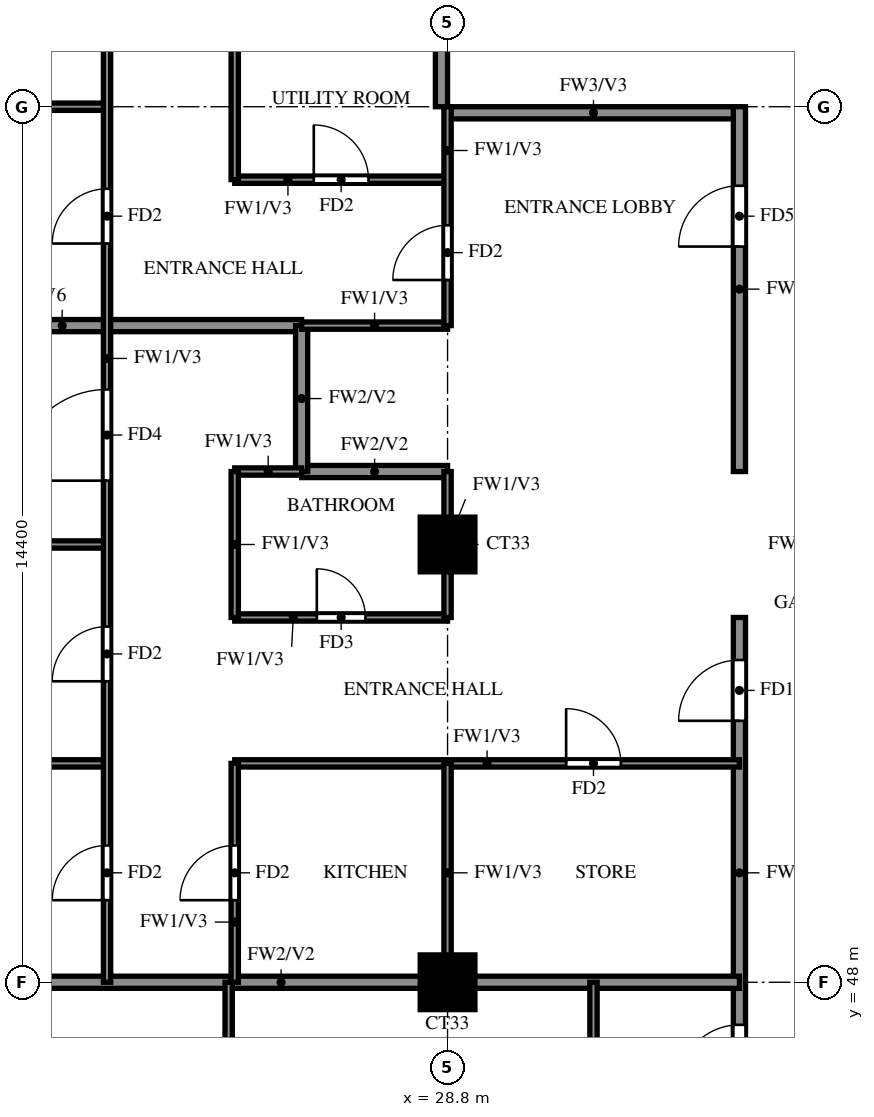
"""IFC4 building model, lengths in metres.
Left out: names, types, materials, properties, quantities, classifications, styles, units other than length and angle.
Written with IfcOpenShell. Run it as: python <this file> out.ifc"""

import sys

from ifc_helpers import new_model, si_unit, direction, frame, frame_2d, origin, origin_2d, place, context, subcontext, project, spatial, rectangle, extrude, source, transform, mapped, element, fill, save


model = new_model("IFC4")
c1 = context("Model", 3, precision=1e-05, world=origin(), true_north=direction((0.0, 1.0)))
c2 = subcontext(c1, "Body", "Model", "MODEL_VIEW")
j1 = project(units=[si_unit("LENGTHUNIT", "METRE"), si_unit("PLANEANGLEUNIT", "RADIAN")], contexts=[c1])
p1 = place(None, origin())
s1 = spatial("IfcSite", under=j1, at=p1, CompositionType="ELEMENT")
p2 = place(p1, origin())
s2 = spatial("IfcBuilding", under=s1, at=p2, CompositionType="ELEMENT")
p3 = place(p2, frame((0.0, 0.0, 211.5)))
s3 = spatial("IfcBuildingStorey", under=s2, at=p3, CompositionType="ELEMENT", Elevation=211.5)
m1 = source(origin(), c2, "Body", "SweptSolid", [
    extrude(rectangle(XDim=0.9, YDim=0.9, at=origin_2d()), origin(), (0.0, 0.0, 1.0), 3.22),
])
for number, where, z_axis, x_axis in (
    (1, (28.8, 48.0, 0.0), (0.0, 0.0, 1.0), (1.0, 0.0, 0.0)),
    (2, (28.8, 55.2, 0.0), (0.0, 0.0, 1.0), (1.0, 0.0, 0.0)),
):
    element("IfcColumn", number, at=place(p3, frame(where, z_axis=z_axis, x_axis=x_axis)), inside=s3, PredefinedType="COLUMN", context=c2, shape_type="MappedRepresentation", body=[
        mapped(m1, transform((0.0, 0.0, 0.0))),
    ])
p4 = place(p3, frame((28.8, 62.3, 0.0), z_axis=(0.0, 0.0, 1.0), x_axis=(1.0, 0.0, 0.0)))
e3 = element("IfcWall", 3, at=p4, inside=s3, PredefinedType="SOLIDWALL", context=c2, shape_type="SweptSolid", body=[
    extrude(rectangle(XDim=4.8, YDim=0.2, at=frame_2d((2.4, 0.0))), origin(), (0.0, 0.0, 1.0), 3.22),
])
p5 = place(p3, frame((28.7, 62.4, 0.0), z_axis=(0.0, 0.0, 1.0), x_axis=(0.0, 1.0, 0.0)))
e4 = element("IfcWall", 4, at=p5, inside=s3, PredefinedType="SOLIDWALL", context=c2, shape_type="SweptSolid", body=[
    extrude(rectangle(XDim=15.6, YDim=0.2, at=frame_2d((7.8, 0.0))), origin(), (0.0, 0.0, 1.0), 3.22),
])
p6 = place(p3, frame((33.6, 45.6, 0.0), z_axis=(0.0, 0.0, 1.0), x_axis=(0.0, 1.0, 0.0)))
e5 = element("IfcWall", 5, at=p6, inside=s3, PredefinedType="SOLIDWALL", context=c2, shape_type="SweptSolid", body=[
    extrude(rectangle(XDim=8.4, YDim=0.2, at=frame_2d((4.2, 0.0))), origin(), (0.0, 0.0, 1.0), 3.22),
])
p7 = place(p6, frame((0.7, 0.0, 0.0)))
e6 = element("IfcOpeningElement", 6, at=p7, cuts=e5, PredefinedType="OPENING", context=c2, shape_type="SweptSolid", body=[
    extrude(rectangle(XDim=1.0, YDim=2.1, at=frame_2d((0.5, 1.05))), frame((0.0, 0.11, 0.0), z_axis=(0.0, -1.0, 0.0), x_axis=(1.0, 0.0, 0.0)), (0.0, 0.0, 1.0), 0.22),
])
p8 = place(p6, frame((6.7, 0.0, 0.0)))
e7 = element("IfcOpeningElement", 7, at=p8, cuts=e5, PredefinedType="OPENING", context=c2, shape_type="SweptSolid", body=[
    extrude(rectangle(XDim=1.0, YDim=2.1, at=frame_2d((0.5, 1.05))), frame((0.0, 0.11, 0.0), z_axis=(0.0, -1.0, 0.0), x_axis=(1.0, 0.0, 0.0)), (0.0, 0.0, 1.0), 0.22),
])
p9 = place(p3, frame((33.6, 56.4, 0.0), z_axis=(0.0, 0.0, 1.0), x_axis=(0.0, 1.0, 0.0)))
e8 = element("IfcWall", 8, at=p9, inside=s3, PredefinedType="SOLIDWALL", context=c2, shape_type="SweptSolid", body=[
    extrude(rectangle(XDim=6.0, YDim=0.2, at=frame_2d((3.0, 0.0))), origin(), (0.0, 0.0, 1.0), 3.22),
])
p10 = place(p9, frame((3.7, 0.0, 0.0)))
e9 = element("IfcOpeningElement", 9, at=p10, cuts=e8, PredefinedType="OPENING", context=c2, shape_type="SweptSolid", body=[
    extrude(rectangle(XDim=1.0, YDim=2.1, at=frame_2d((0.5, 1.05))), frame((0.0, 0.11, 0.0), z_axis=(0.0, -1.0, 0.0), x_axis=(1.0, 0.0, 0.0)), (0.0, 0.0, 1.0), 0.22),
])
p11 = place(p3, frame((18.525, 48.0, 0.0), z_axis=(0.0, 0.0, 1.0), x_axis=(1.0, 0.0, 0.0)))
e10 = element("IfcWall", 10, at=p11, inside=s3, PredefinedType="SOLIDWALL", context=c2, shape_type="SweptSolid", body=[
    extrude(rectangle(XDim=15.075, YDim=0.2, at=frame_2d((7.538, 0.0))), origin(), (0.0, 0.0, 1.0), 3.22),
])
p12 = place(p3, frame((26.4, 56.4, 0.0), z_axis=(0.0, 0.0, 1.0), x_axis=(1.0, 0.0, 0.0)))
e11 = element("IfcWall", 11, at=p12, inside=s3, PredefinedType="SOLIDWALL", context=c2, shape_type="SweptSolid", body=[
    extrude(rectangle(XDim=2.4, YDim=0.2, at=frame_2d((1.2, 0.0))), origin(), (0.0, 0.0, 1.0), 3.22),
])
p13 = place(p3, frame((18.525, 58.8, 0.0), z_axis=(0.0, 0.0, 1.0), x_axis=(1.0, 0.0, 0.0)))
e12 = element("IfcWall", 12, at=p13, inside=s3, PredefinedType="SOLIDWALL", context=c2, shape_type="SweptSolid", body=[
    extrude(rectangle(XDim=7.875, YDim=0.2, at=frame_2d((3.938, 0.0))), origin(), (0.0, 0.0, 1.0), 2.32),
])
p14 = place(p3, frame((26.4, 56.4, 0.0), z_axis=(0.0, 0.0, 1.0), x_axis=(0.0, 1.0, 0.0)))
e13 = element("IfcWall", 13, at=p14, inside=s3, PredefinedType="SOLIDWALL", context=c2, shape_type="SweptSolid", body=[
    extrude(rectangle(XDim=2.4, YDim=0.2, at=frame_2d((1.2, 0.0))), origin(), (0.0, 0.0, 1.0), 3.22),
])
p15 = place(p3, frame((18.525, 51.6, 0.0), z_axis=(0.0, 0.0, 1.0), x_axis=(1.0, 0.0, 0.0)))
e14 = element("IfcWall", 14, at=p15, inside=s3, PredefinedType="PARTITIONING", context=c2, shape_type="SweptSolid", body=[
    extrude(rectangle(XDim=4.675, YDim=0.12, at=frame_2d((2.337, 0.0))), origin(), (0.0, 0.0, 1.0), 2.32),
])
p16 = place(p3, frame((25.3, 51.6, 0.0), z_axis=(0.0, 0.0, 1.0), x_axis=(1.0, 0.0, 0.0)))
e15 = element("IfcWall", 15, at=p16, inside=s3, PredefinedType="PARTITIONING", context=c2, shape_type="SweptSolid", body=[
    extrude(rectangle(XDim=8.3, YDim=0.12, at=frame_2d((4.15, 0.0))), origin(), (0.0, 0.0, 1.0), 3.22),
])
p17 = place(p16, frame((5.45, 0.0, 0.0)))
e16 = element("IfcOpeningElement", 16, at=p17, cuts=e15, PredefinedType="OPENING", context=c2, shape_type="SweptSolid", body=[
    extrude(rectangle(XDim=0.9, YDim=2.1, at=frame_2d((0.45, 1.05))), frame((0.0, 0.07, 0.0), z_axis=(0.0, -1.0, 0.0), x_axis=(1.0, 0.0, 0.0)), (0.0, 0.0, 1.0), 0.14),
])
p18 = place(p3, frame((25.3, 54.0, 0.0), z_axis=(0.0, 0.0, 1.0), x_axis=(1.0, 0.0, 0.0)))
e17 = element("IfcWall", 17, at=p18, inside=s3, PredefinedType="PARTITIONING", context=c2, shape_type="SweptSolid", body=[
    extrude(rectangle(XDim=3.5, YDim=0.12, at=frame_2d((1.75, 0.0))), origin(), (0.0, 0.0, 1.0), 3.22),
])
p19 = place(p18, frame((1.35, 0.0, 0.0)))
e18 = element("IfcOpeningElement", 18, at=p19, cuts=e17, PredefinedType="OPENING", context=c2, shape_type="SweptSolid", body=[
    extrude(rectangle(XDim=0.8, YDim=2.1, at=frame_2d((0.4, 1.05))), frame((0.0, 0.07, 0.0), z_axis=(0.0, -1.0, 0.0), x_axis=(1.0, 0.0, 0.0)), (0.0, 0.0, 1.0), 0.14),
])
p20 = place(p3, frame((18.525, 55.2, 0.0), z_axis=(0.0, 0.0, 1.0), x_axis=(1.0, 0.0, 0.0)))
e19 = element("IfcWall", 19, at=p20, inside=s3, PredefinedType="PARTITIONING", context=c2, shape_type="SweptSolid", body=[
    extrude(rectangle(XDim=4.675, YDim=0.12, at=frame_2d((2.337, 0.0))), origin(), (0.0, 0.0, 1.0), 3.22),
])
p21 = place(p3, frame((25.3, 56.4, 0.0), z_axis=(0.0, 0.0, 1.0), x_axis=(1.0, 0.0, 0.0)))
e20 = element("IfcWall", 20, at=p21, inside=s3, PredefinedType="PARTITIONING", context=c2, shape_type="SweptSolid", body=[
    extrude(rectangle(XDim=1.1, YDim=0.12, at=frame_2d((0.55, 0.0))), origin(), (0.0, 0.0, 1.0), 3.22),
])
p22 = place(p3, frame((26.4, 58.8, 0.0), z_axis=(0.0, 0.0, 1.0), x_axis=(1.0, 0.0, 0.0)))
e21 = element("IfcWall", 21, at=p22, inside=s3, PredefinedType="PARTITIONING", context=c2, shape_type="SweptSolid", body=[
    extrude(rectangle(XDim=2.4, YDim=0.12, at=frame_2d((1.2, 0.0))), origin(), (0.0, 0.0, 1.0), 3.22),
])
p23 = place(p3, frame((25.3, 61.2, 0.0), z_axis=(0.0, 0.0, 1.0), x_axis=(1.0, 0.0, 0.0)))
e22 = element("IfcWall", 22, at=p23, inside=s3, PredefinedType="PARTITIONING", context=c2, shape_type="SweptSolid", body=[
    extrude(rectangle(XDim=3.5, YDim=0.12, at=frame_2d((1.75, 0.0))), origin(), (0.0, 0.0, 1.0), 3.22),
])
p24 = place(p23, frame((1.3, 0.0, 0.0)))
e23 = element("IfcOpeningElement", 23, at=p24, cuts=e22, PredefinedType="OPENING", context=c2, shape_type="SweptSolid", body=[
    extrude(rectangle(XDim=0.9, YDim=2.1, at=frame_2d((0.45, 1.05))), frame((0.0, 0.07, 0.0), z_axis=(0.0, -1.0, 0.0), x_axis=(1.0, 0.0, 0.0)), (0.0, 0.0, 1.0), 0.14),
])
p25 = place(p3, frame((18.525, 62.4, 0.0), z_axis=(0.0, 0.0, 1.0), x_axis=(1.0, 0.0, 0.0)))
e24 = element("IfcWall", 24, at=p25, inside=s3, PredefinedType="PARTITIONING", context=c2, shape_type="SweptSolid", body=[
    extrude(rectangle(XDim=4.675, YDim=0.12, at=frame_2d((2.337, 0.0))), origin(), (0.0, 0.0, 1.0), 3.22),
])
p26 = place(p3, frame((23.2, 48.0, 0.0), z_axis=(0.0, 0.0, 1.0), x_axis=(0.0, 1.0, 0.0)))
e25 = element("IfcWall", 25, at=p26, inside=s3, PredefinedType="PARTITIONING", context=c2, shape_type="SweptSolid", body=[
    extrude(rectangle(XDim=21.6, YDim=0.12, at=frame_2d((10.8, 0.0))), origin(), (0.0, 0.0, 1.0), 3.22),
])
p27 = place(p26, frame((1.35, 0.0, 0.0)))
e26 = element("IfcOpeningElement", 26, at=p27, cuts=e25, PredefinedType="OPENING", context=c2, shape_type="SweptSolid", body=[
    extrude(rectangle(XDim=0.9, YDim=2.1, at=frame_2d((0.45, 1.05))), frame((0.0, 0.07, 0.0), z_axis=(0.0, -1.0, 0.0), x_axis=(1.0, 0.0, 0.0)), (0.0, 0.0, 1.0), 0.14),
])
p28 = place(p26, frame((4.95, 0.0, 0.0)))
e27 = element("IfcOpeningElement", 27, at=p28, cuts=e25, PredefinedType="OPENING", context=c2, shape_type="SweptSolid", body=[
    extrude(rectangle(XDim=0.9, YDim=2.1, at=frame_2d((0.45, 1.05))), frame((0.0, 0.07, 0.0), z_axis=(0.0, -1.0, 0.0), x_axis=(1.0, 0.0, 0.0)), (0.0, 0.0, 1.0), 0.14),
])
p29 = place(p26, frame((8.25, 0.0, 0.0)))
e28 = element("IfcOpeningElement", 28, at=p29, cuts=e25, PredefinedType="OPENING", context=c2, shape_type="SweptSolid", body=[
    extrude(rectangle(XDim=1.5, YDim=2.1, at=frame_2d((0.75, 1.05))), frame((0.0, 0.07, 0.0), z_axis=(0.0, -1.0, 0.0), x_axis=(1.0, 0.0, 0.0)), (0.0, 0.0, 1.0), 0.14),
])
p30 = place(p26, frame((12.15, 0.0, 0.0)))
e29 = element("IfcOpeningElement", 29, at=p30, cuts=e25, PredefinedType="OPENING", context=c2, shape_type="SweptSolid", body=[
    extrude(rectangle(XDim=0.9, YDim=2.1, at=frame_2d((0.45, 1.05))), frame((0.0, 0.07, 0.0), z_axis=(0.0, -1.0, 0.0), x_axis=(1.0, 0.0, 0.0)), (0.0, 0.0, 1.0), 0.14),
])
p31 = place(p26, frame((17.55, 0.0, 0.0)))
e30 = element("IfcOpeningElement", 30, at=p31, cuts=e25, PredefinedType="OPENING", context=c2, shape_type="SweptSolid", body=[
    extrude(rectangle(XDim=0.9, YDim=2.1, at=frame_2d((0.45, 1.05))), frame((0.0, 0.07, 0.0), z_axis=(0.0, -1.0, 0.0), x_axis=(1.0, 0.0, 0.0)), (0.0, 0.0, 1.0), 0.14),
])
p32 = place(p3, frame((25.2, 39.725, 0.0), z_axis=(0.0, 0.0, 1.0), x_axis=(0.0, 1.0, 0.0)))
e31 = element("IfcWall", 31, at=p32, inside=s3, PredefinedType="PARTITIONING", context=c2, shape_type="SweptSolid", body=[
    extrude(rectangle(XDim=8.275, YDim=0.12, at=frame_2d((4.137, 0.0))), origin(), (0.0, 0.0, 1.0), 3.22),
])
p33 = place(p32, frame((4.525, 0.0, 0.0)))
e32 = element("IfcOpeningElement", 32, at=p33, cuts=e31, PredefinedType="OPENING", context=c2, shape_type="SweptSolid", body=[
    extrude(rectangle(XDim=0.9, YDim=2.1, at=frame_2d((0.45, 1.05))), frame((0.0, 0.07, 0.0), z_axis=(0.0, -1.0, 0.0), x_axis=(1.0, 0.0, 0.0)), (0.0, 0.0, 1.0), 0.14),
])
p34 = place(p3, frame((25.3, 48.0, 0.0), z_axis=(0.0, 0.0, 1.0), x_axis=(0.0, 1.0, 0.0)))
e33 = element("IfcWall", 33, at=p34, inside=s3, PredefinedType="PARTITIONING", context=c2, shape_type="SweptSolid", body=[
    extrude(rectangle(XDim=3.6, YDim=0.12, at=frame_2d((1.8, 0.0))), origin(), (0.0, 0.0, 1.0), 3.22),
])
p35 = place(p34, frame((1.35, 0.0, 0.0)))
e34 = element("IfcOpeningElement", 34, at=p35, cuts=e33, PredefinedType="OPENING", context=c2, shape_type="SweptSolid", body=[
    extrude(rectangle(XDim=0.9, YDim=2.1, at=frame_2d((0.45, 1.05))), frame((0.0, 0.07, 0.0), z_axis=(0.0, -1.0, 0.0), x_axis=(1.0, 0.0, 0.0)), (0.0, 0.0, 1.0), 0.14),
])
p36 = place(p3, frame((25.3, 54.0, 0.0), z_axis=(0.0, 0.0, 1.0), x_axis=(0.0, 1.0, 0.0)))
e35 = element("IfcWall", 35, at=p36, inside=s3, PredefinedType="PARTITIONING", context=c2, shape_type="SweptSolid", body=[
    extrude(rectangle(XDim=2.4, YDim=0.12, at=frame_2d((1.2, 0.0))), origin(), (0.0, 0.0, 1.0), 3.22),
])
p37 = place(p3, frame((25.3, 61.2, 0.0), z_axis=(0.0, 0.0, 1.0), x_axis=(0.0, 1.0, 0.0)))
e36 = element("IfcWall", 36, at=p37, inside=s3, PredefinedType="PARTITIONING", context=c2, shape_type="SweptSolid", body=[
    extrude(rectangle(XDim=12.0, YDim=0.12, at=frame_2d((6.0, 0.0))), origin(), (0.0, 0.0, 1.0), 3.22),
])
p38 = place(p37, frame((4.2, 0.0, 0.0)))
e37 = element("IfcOpeningElement", 37, at=p38, cuts=e36, PredefinedType="OPENING", context=c2, shape_type="SweptSolid", body=[
    extrude(rectangle(XDim=0.9, YDim=2.1, at=frame_2d((0.45, 1.05))), frame((0.0, 0.07, 0.0), z_axis=(0.0, -1.0, 0.0), x_axis=(1.0, 0.0, 0.0)), (0.0, 0.0, 1.0), 0.14),
])
p39 = place(p37, frame((7.975, 0.0, 0.0)))
e38 = element("IfcOpeningElement", 38, at=p39, cuts=e36, PredefinedType="OPENING", context=c2, shape_type="SweptSolid", body=[
    extrude(rectangle(XDim=0.8, YDim=2.1, at=frame_2d((0.4, 1.05))), frame((0.0, 0.07, 0.0), z_axis=(0.0, -1.0, 0.0), x_axis=(1.0, 0.0, 0.0)), (0.0, 0.0, 1.0), 0.14),
])
p40 = place(p37, frame((10.45, 0.0, 0.0)))
e39 = element("IfcOpeningElement", 39, at=p40, cuts=e36, PredefinedType="OPENING", context=c2, shape_type="SweptSolid", body=[
    extrude(rectangle(XDim=0.8, YDim=2.1, at=frame_2d((0.4, 1.05))), frame((0.0, 0.07, 0.0), z_axis=(0.0, -1.0, 0.0), x_axis=(1.0, 0.0, 0.0)), (0.0, 0.0, 1.0), 0.14),
])
p41 = place(p3, frame((28.8, 48.0, 0.0), z_axis=(0.0, 0.0, 1.0), x_axis=(0.0, 1.0, 0.0)))
e40 = element("IfcWall", 40, at=p41, inside=s3, PredefinedType="PARTITIONING", context=c2, shape_type="SweptSolid", body=[
    extrude(rectangle(XDim=3.6, YDim=0.12, at=frame_2d((1.8, 0.0))), origin(), (0.0, 0.0, 1.0), 3.22),
])
p42 = place(p3, frame((28.8, 54.0, 0.0), z_axis=(0.0, 0.0, 1.0), x_axis=(0.0, 1.0, 0.0)))
e41 = element("IfcWall", 41, at=p42, inside=s3, PredefinedType="PARTITIONING", context=c2, shape_type="SweptSolid", body=[
    extrude(rectangle(XDim=2.4, YDim=0.12, at=frame_2d((1.2, 0.0))), origin(), (0.0, 0.0, 1.0), 3.22),
])
p43 = place(p3, frame((28.8, 58.8, 0.0), z_axis=(0.0, 0.0, 1.0), x_axis=(0.0, 1.0, 0.0)))
e42 = element("IfcWall", 42, at=p43, inside=s3, PredefinedType="PARTITIONING", context=c2, shape_type="SweptSolid", body=[
    extrude(rectangle(XDim=3.6, YDim=0.12, at=frame_2d((1.8, 0.0))), origin(), (0.0, 0.0, 1.0), 3.22),
])
p44 = place(p43, frame((0.75, 0.0, 0.0)))
e43 = element("IfcOpeningElement", 43, at=p44, cuts=e42, PredefinedType="OPENING", context=c2, shape_type="SweptSolid", body=[
    extrude(rectangle(XDim=0.9, YDim=2.1, at=frame_2d((0.45, 1.05))), frame((0.0, 0.07, 0.0), z_axis=(0.0, -1.0, 0.0), x_axis=(1.0, 0.0, 0.0)), (0.0, 0.0, 1.0), 0.14),
])
p45 = place(p3, frame((31.2, 45.6, 0.0), z_axis=(0.0, 0.0, 1.0), x_axis=(0.0, 1.0, 0.0)))
e44 = element("IfcWall", 44, at=p45, inside=s3, PredefinedType="PARTITIONING", context=c2, shape_type="SweptSolid", body=[
    extrude(rectangle(XDim=2.4, YDim=0.12, at=frame_2d((1.2, 0.0))), origin(), (0.0, 0.0, 1.0), 3.22),
])
p46 = place(p7, origin())
e45 = element("IfcDoor", 45, at=p46, inside=s3, OperationType="SINGLE_SWING_LEFT", PredefinedType="DOOR", context=c2, shape_type="SweptSolid", body=[
    extrude(rectangle(XDim=1.0, YDim=2.1, at=frame_2d((0.5, 1.05))), frame((0.0, 0.025, 0.0), z_axis=(0.0, -1.0, 0.0), x_axis=(1.0, 0.0, 0.0)), (0.0, 0.0, 1.0), 0.05),
])
fill(e6, e45)
p47 = place(p8, origin())
e46 = element("IfcDoor", 46, at=p47, inside=s3, OperationType="SINGLE_SWING_LEFT", PredefinedType="DOOR", context=c2, shape_type="SweptSolid", body=[
    extrude(rectangle(XDim=1.0, YDim=2.1, at=frame_2d((0.5, 1.05))), frame((0.0, 0.025, 0.0), z_axis=(0.0, -1.0, 0.0), x_axis=(1.0, 0.0, 0.0)), (0.0, 0.0, 1.0), 0.05),
])
fill(e7, e46)
p48 = place(p27, origin())
e47 = element("IfcDoor", 47, at=p48, inside=s3, OperationType="SINGLE_SWING_RIGHT", PredefinedType="DOOR", context=c2, shape_type="SweptSolid", body=[
    extrude(rectangle(XDim=0.9, YDim=2.1, at=frame_2d((0.45, 1.05))), frame((0.0, 0.025, 0.0), z_axis=(0.0, -1.0, 0.0), x_axis=(1.0, 0.0, 0.0)), (0.0, 0.0, 1.0), 0.05),
])
fill(e26, e47)
p49 = place(p28, origin())
e48 = element("IfcDoor", 48, at=p49, inside=s3, OperationType="SINGLE_SWING_LEFT", PredefinedType="DOOR", context=c2, shape_type="SweptSolid", body=[
    extrude(rectangle(XDim=0.9, YDim=2.1, at=frame_2d((0.45, 1.05))), frame((0.0, 0.025, 0.0), z_axis=(0.0, -1.0, 0.0), x_axis=(1.0, 0.0, 0.0)), (0.0, 0.0, 1.0), 0.05),
])
fill(e27, e48)
p50 = place(p29, origin())
e49 = element("IfcDoor", 49, at=p50, inside=s3, OperationType="SINGLE_SWING_LEFT", PredefinedType="DOOR", context=c2, shape_type="SweptSolid", body=[
    extrude(rectangle(XDim=1.5, YDim=2.1, at=frame_2d((0.75, 1.05))), frame((0.0, 0.025, 0.0), z_axis=(0.0, -1.0, 0.0), x_axis=(1.0, 0.0, 0.0)), (0.0, 0.0, 1.0), 0.05),
])
fill(e28, e49)
p51 = place(p35, origin())
e50 = element("IfcDoor", 50, at=p51, inside=s3, OperationType="SINGLE_SWING_RIGHT", PredefinedType="DOOR", context=c2, shape_type="SweptSolid", body=[
    extrude(rectangle(XDim=0.9, YDim=2.1, at=frame_2d((0.45, 1.05))), frame((0.0, 0.025, 0.0), z_axis=(0.0, -1.0, 0.0), x_axis=(1.0, 0.0, 0.0)), (0.0, 0.0, 1.0), 0.05),
])
fill(e34, e50)
p52 = place(p19, origin())
e51 = element("IfcDoor", 51, at=p52, inside=s3, OperationType="SINGLE_SWING_LEFT", PredefinedType="DOOR", context=c2, shape_type="SweptSolid", body=[
    extrude(rectangle(XDim=0.8, YDim=2.1, at=frame_2d((0.4, 1.05))), frame((0.0, 0.025, 0.0), z_axis=(0.0, -1.0, 0.0), x_axis=(1.0, 0.0, 0.0)), (0.0, 0.0, 1.0), 0.05),
])
fill(e18, e51)
p53 = place(p17, origin())
e52 = element("IfcDoor", 52, at=p53, inside=s3, OperationType="SINGLE_SWING_LEFT", PredefinedType="DOOR", context=c2, shape_type="SweptSolid", body=[
    extrude(rectangle(XDim=0.9, YDim=2.1, at=frame_2d((0.45, 1.05))), frame((0.0, 0.025, 0.0), z_axis=(0.0, -1.0, 0.0), x_axis=(1.0, 0.0, 0.0)), (0.0, 0.0, 1.0), 0.05),
])
fill(e16, e52)
p54 = place(p44, origin())
e53 = element("IfcDoor", 53, at=p54, inside=s3, OperationType="SINGLE_SWING_RIGHT", PredefinedType="DOOR", context=c2, shape_type="SweptSolid", body=[
    extrude(rectangle(XDim=0.9, YDim=2.1, at=frame_2d((0.45, 1.05))), frame((0.0, 0.025, 0.0), z_axis=(0.0, -1.0, 0.0), x_axis=(1.0, 0.0, 0.0)), (0.0, 0.0, 1.0), 0.05),
])
fill(e43, e53)
p55 = place(p10, origin())
e54 = element("IfcDoor", 54, at=p55, inside=s3, OperationType="SINGLE_SWING_LEFT", PredefinedType="DOOR", context=c2, shape_type="SweptSolid", body=[
    extrude(rectangle(XDim=1.0, YDim=2.1, at=frame_2d((0.5, 1.05))), frame((0.0, 0.025, 0.0), z_axis=(0.0, -1.0, 0.0), x_axis=(1.0, 0.0, 0.0)), (0.0, 0.0, 1.0), 0.05),
])
fill(e9, e54)
p56 = place(p30, origin())
e55 = element("IfcDoor", 55, at=p56, inside=s3, OperationType="SINGLE_SWING_LEFT", PredefinedType="DOOR", context=c2, shape_type="SweptSolid", body=[
    extrude(rectangle(XDim=0.9, YDim=2.1, at=frame_2d((0.45, 1.05))), frame((0.0, 0.025, 0.0), z_axis=(0.0, -1.0, 0.0), x_axis=(1.0, 0.0, 0.0)), (0.0, 0.0, 1.0), 0.05),
])
fill(e29, e55)
p57 = place(p24, origin())
e56 = element("IfcDoor", 56, at=p57, inside=s3, OperationType="SINGLE_SWING_RIGHT", PredefinedType="DOOR", context=c2, shape_type="SweptSolid", body=[
    extrude(rectangle(XDim=0.9, YDim=2.1, at=frame_2d((0.45, 1.05))), frame((0.0, 0.025, 0.0), z_axis=(0.0, -1.0, 0.0), x_axis=(1.0, 0.0, 0.0)), (0.0, 0.0, 1.0), 0.05),
])
fill(e23, e56)
save(model, sys.argv[1])
